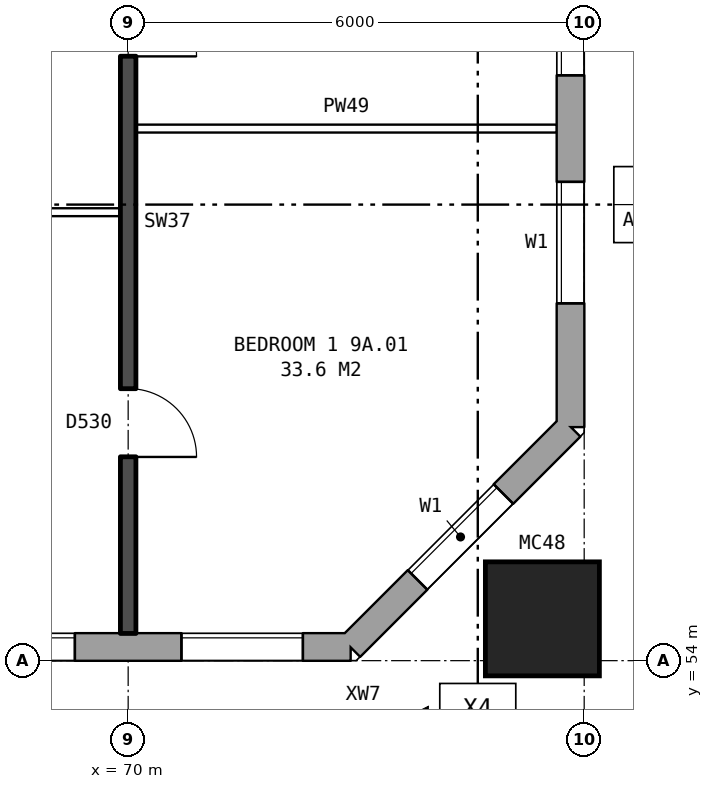
"""IFC4 building model, lengths in metres.
Left out: names, types, materials, properties, quantities, classifications, styles, units other than length and angle.
Written with IfcOpenShell. Run it as: python <this file> out.ifc"""

import sys

from ifc_helpers import new_model, si_unit, direction, frame, frame_2d, origin, origin_2d, place, context, subcontext, project, spatial, rectangle, hollow_rectangle, extrude, element, fill, save


model = new_model("IFC4")
c1 = context("Model", 3, precision=1e-05, world=origin(), true_north=direction((0.0, 1.0)))
c2 = subcontext(c1, "Body", "Model", "MODEL_VIEW")
j1 = project(units=[si_unit("LENGTHUNIT", "METRE"), si_unit("PLANEANGLEUNIT", "RADIAN")], contexts=[c1])
p1 = place(None, origin())
s1 = spatial("IfcSite", under=j1, at=p1, CompositionType="ELEMENT")
p2 = place(p1, origin())
s2 = spatial("IfcBuilding", under=s1, at=p2, CompositionType="ELEMENT")
p3 = place(p2, frame((0.0, 0.0, 35.0)))
s3 = spatial("IfcBuildingStorey", under=s2, at=p3, CompositionType="ELEMENT", Elevation=35.0)
p4 = place(p3, frame((75.45, 54.55, 0.0), z_axis=(0.0, 0.0, 1.0), x_axis=(1.0, 0.0, 0.0)))
e1 = element("IfcColumn", 1, at=p4, inside=s3, PredefinedType="COLUMN", context=c2, shape_type="SweptSolid", body=[
    extrude(hollow_rectangle(XDim=1.5, YDim=1.5, WallThickness=0.08, at=origin_2d()), origin(), (0.0, 0.0, 1.0), 3.1),
])
p5 = place(p3, frame((22.825, 54.18, 0.0), z_axis=(0.0, 0.0, 1.0), x_axis=(1.0, 0.0, 0.0)))
e2 = element("IfcWall", 2, at=p5, inside=s3, PredefinedType="STANDARD", context=c2, shape_type="SweptSolid", body=[
    extrude(rectangle(XDim=50.101, YDim=0.36, at=frame_2d((25.05, 0.0))), origin(), (0.0, 0.0, 1.0), 2.85),
])
p6 = place(p5, frame((2.875, 0.0, 0.8)))
e3 = element("IfcOpeningElement", 3, at=p6, cuts=e2, PredefinedType="OPENING", context=c2, shape_type="SweptSolid", body=[
    extrude(rectangle(XDim=1.6, YDim=1.8, at=frame_2d((0.8, 0.9))), frame((0.0, 0.19, 0.0), z_axis=(0.0, -1.0, 0.0), x_axis=(1.0, 0.0, 0.0)), (0.0, 0.0, 1.0), 0.38),
])
p7 = place(p5, frame((5.875, 0.0, 0.8)))
e4 = element("IfcOpeningElement", 4, at=p7, cuts=e2, PredefinedType="OPENING", context=c2, shape_type="SweptSolid", body=[
    extrude(rectangle(XDim=1.6, YDim=1.8, at=frame_2d((0.8, 0.9))), frame((0.0, 0.19, 0.0), z_axis=(0.0, -1.0, 0.0), x_axis=(1.0, 0.0, 0.0)), (0.0, 0.0, 1.0), 0.38),
])
p8 = place(p5, frame((8.875, 0.0, 0.8)))
e5 = element("IfcOpeningElement", 5, at=p8, cuts=e2, PredefinedType="OPENING", context=c2, shape_type="SweptSolid", body=[
    extrude(rectangle(XDim=1.6, YDim=1.8, at=frame_2d((0.8, 0.9))), frame((0.0, 0.19, 0.0), z_axis=(0.0, -1.0, 0.0), x_axis=(1.0, 0.0, 0.0)), (0.0, 0.0, 1.0), 0.38),
])
p9 = place(p5, frame((11.875, 0.0, 0.8)))
e6 = element("IfcOpeningElement", 6, at=p9, cuts=e2, PredefinedType="OPENING", context=c2, shape_type="SweptSolid", body=[
    extrude(rectangle(XDim=1.6, YDim=1.8, at=frame_2d((0.8, 0.9))), frame((0.0, 0.19, 0.0), z_axis=(0.0, -1.0, 0.0), x_axis=(1.0, 0.0, 0.0)), (0.0, 0.0, 1.0), 0.38),
])
p10 = place(p5, frame((14.875, 0.0, 0.8)))
e7 = element("IfcOpeningElement", 7, at=p10, cuts=e2, PredefinedType="OPENING", context=c2, shape_type="SweptSolid", body=[
    extrude(rectangle(XDim=1.6, YDim=1.8, at=frame_2d((0.8, 0.9))), frame((0.0, 0.19, 0.0), z_axis=(0.0, -1.0, 0.0), x_axis=(1.0, 0.0, 0.0)), (0.0, 0.0, 1.0), 0.38),
])
p11 = place(p5, frame((17.875, 0.0, 0.8)))
e8 = element("IfcOpeningElement", 8, at=p11, cuts=e2, PredefinedType="OPENING", context=c2, shape_type="SweptSolid", body=[
    extrude(rectangle(XDim=1.6, YDim=1.8, at=frame_2d((0.8, 0.9))), frame((0.0, 0.19, 0.0), z_axis=(0.0, -1.0, 0.0), x_axis=(1.0, 0.0, 0.0)), (0.0, 0.0, 1.0), 0.38),
])
p12 = place(p5, frame((19.775, 0.0, 0.8)))
e9 = element("IfcOpeningElement", 9, at=p12, cuts=e2, PredefinedType="OPENING", context=c2, shape_type="SweptSolid", body=[
    extrude(rectangle(XDim=1.6, YDim=1.8, at=frame_2d((0.8, 0.9))), frame((0.0, 0.19, 0.0), z_axis=(0.0, -1.0, 0.0), x_axis=(1.0, 0.0, 0.0)), (0.0, 0.0, 1.0), 0.38),
])
p13 = place(p5, frame((23.375, 0.0, 0.15)))
e10 = element("IfcOpeningElement", 10, at=p13, cuts=e2, PredefinedType="OPENING", context=c2, shape_type="SweptSolid", body=[
    extrude(rectangle(XDim=0.6, YDim=0.9, at=frame_2d((0.3, 0.45))), frame((0.0, 0.19, 0.0), z_axis=(0.0, -1.0, 0.0), x_axis=(1.0, 0.0, 0.0)), (0.0, 0.0, 1.0), 0.38),
])
p14 = place(p5, frame((27.275, 0.0, 1.7)))
e11 = element("IfcOpeningElement", 11, at=p14, cuts=e2, PredefinedType="OPENING", context=c2, shape_type="SweptSolid", body=[
    extrude(rectangle(XDim=0.6, YDim=0.9, at=frame_2d((0.3, 0.45))), frame((0.0, 0.19, 0.0), z_axis=(0.0, -1.0, 0.0), x_axis=(1.0, 0.0, 0.0)), (0.0, 0.0, 1.0), 0.38),
])
p15 = place(p5, frame((29.875, 0.0, 0.8)))
e12 = element("IfcOpeningElement", 12, at=p15, cuts=e2, PredefinedType="OPENING", context=c2, shape_type="SweptSolid", body=[
    extrude(rectangle(XDim=1.6, YDim=1.8, at=frame_2d((0.8, 0.9))), frame((0.0, 0.19, 0.0), z_axis=(0.0, -1.0, 0.0), x_axis=(1.0, 0.0, 0.0)), (0.0, 0.0, 1.0), 0.38),
])
p16 = place(p5, frame((32.875, 0.0, 0.8)))
e13 = element("IfcOpeningElement", 13, at=p16, cuts=e2, PredefinedType="OPENING", context=c2, shape_type="SweptSolid", body=[
    extrude(rectangle(XDim=1.6, YDim=1.8, at=frame_2d((0.8, 0.9))), frame((0.0, 0.19, 0.0), z_axis=(0.0, -1.0, 0.0), x_axis=(1.0, 0.0, 0.0)), (0.0, 0.0, 1.0), 0.38),
])
p17 = place(p5, frame((35.875, 0.0, 0.8)))
e14 = element("IfcOpeningElement", 14, at=p17, cuts=e2, PredefinedType="OPENING", context=c2, shape_type="SweptSolid", body=[
    extrude(rectangle(XDim=1.6, YDim=1.8, at=frame_2d((0.8, 0.9))), frame((0.0, 0.19, 0.0), z_axis=(0.0, -1.0, 0.0), x_axis=(1.0, 0.0, 0.0)), (0.0, 0.0, 1.0), 0.38),
])
p18 = place(p5, frame((38.875, 0.0, 0.8)))
e15 = element("IfcOpeningElement", 15, at=p18, cuts=e2, PredefinedType="OPENING", context=c2, shape_type="SweptSolid", body=[
    extrude(rectangle(XDim=1.6, YDim=1.8, at=frame_2d((0.8, 0.9))), frame((0.0, 0.19, 0.0), z_axis=(0.0, -1.0, 0.0), x_axis=(1.0, 0.0, 0.0)), (0.0, 0.0, 1.0), 0.38),
])
p19 = place(p5, frame((41.875, 0.0, 0.8)))
e16 = element("IfcOpeningElement", 16, at=p19, cuts=e2, PredefinedType="OPENING", context=c2, shape_type="SweptSolid", body=[
    extrude(rectangle(XDim=1.6, YDim=1.8, at=frame_2d((0.8, 0.9))), frame((0.0, 0.19, 0.0), z_axis=(0.0, -1.0, 0.0), x_axis=(1.0, 0.0, 0.0)), (0.0, 0.0, 1.0), 0.38),
])
p20 = place(p5, frame((44.875, 0.0, 0.8)))
e17 = element("IfcOpeningElement", 17, at=p20, cuts=e2, PredefinedType="OPENING", context=c2, shape_type="SweptSolid", body=[
    extrude(rectangle(XDim=1.6, YDim=1.8, at=frame_2d((0.8, 0.9))), frame((0.0, 0.19, 0.0), z_axis=(0.0, -1.0, 0.0), x_axis=(1.0, 0.0, 0.0)), (0.0, 0.0, 1.0), 0.38),
])
p21 = place(p5, frame((47.875, 0.0, 0.8)))
e18 = element("IfcOpeningElement", 18, at=p21, cuts=e2, PredefinedType="OPENING", context=c2, shape_type="SweptSolid", body=[
    extrude(rectangle(XDim=1.6, YDim=1.8, at=frame_2d((0.8, 0.9))), frame((0.0, 0.19, 0.0), z_axis=(0.0, -1.0, 0.0), x_axis=(1.0, 0.0, 0.0)), (0.0, 0.0, 1.0), 0.38),
])
p22 = place(p5, frame((21.675, 0.0, 1.4)))
e19 = element("IfcOpeningElement", 19, at=p22, cuts=e2, PredefinedType="OPENING", context=c2, shape_type="SweptSolid", body=[
    extrude(rectangle(XDim=0.6, YDim=1.2, at=frame_2d((0.3, 0.6))), frame((0.0, 0.19, 0.0), z_axis=(0.0, -1.0, 0.0), x_axis=(1.0, 0.0, 0.0)), (0.0, 0.0, 1.0), 0.38),
])
p23 = place(p5, frame((24.275, 0.0, 0.15)))
e20 = element("IfcOpeningElement", 20, at=p23, cuts=e2, PredefinedType="OPENING", context=c2, shape_type="SweptSolid", body=[
    extrude(rectangle(XDim=1.6, YDim=1.5, at=frame_2d((0.8, 0.75))), frame((0.0, 0.19, 0.0), z_axis=(0.0, -1.0, 0.0), x_axis=(1.0, 0.0, 0.0)), (0.0, 0.0, 1.0), 0.38),
])
p24 = place(p5, frame((28.175, 0.0, 1.1)))
e21 = element("IfcOpeningElement", 21, at=p24, cuts=e2, PredefinedType="OPENING", context=c2, shape_type="SweptSolid", body=[
    extrude(rectangle(XDim=0.8, YDim=1.5, at=frame_2d((0.4, 0.75))), frame((0.0, 0.19, 0.0), z_axis=(0.0, -1.0, 0.0), x_axis=(1.0, 0.0, 0.0)), (0.0, 0.0, 1.0), 0.38),
])
p25 = place(p3, frame((72.925, 54.18, 0.0), z_axis=(0.0, 0.0, 1.0), x_axis=(0.707106781187, 0.707106781187, 0.0)))
e22 = element("IfcWall", 22, at=p25, inside=s3, PredefinedType="STANDARD", context=c2, shape_type="SweptSolid", body=[
    extrude(rectangle(XDim=4.094, YDim=0.36, at=frame_2d((2.047, 0.0))), origin(), (0.0, 0.0, 1.0), 2.85),
])
p26 = place(p25, frame((1.247, 0.0, 0.8)))
e23 = element("IfcOpeningElement", 23, at=p26, cuts=e22, PredefinedType="OPENING", context=c2, shape_type="SweptSolid", body=[
    extrude(rectangle(XDim=1.6, YDim=1.8, at=frame_2d((0.8, 0.9))), frame((0.0, 0.19, 0.0), z_axis=(0.0, -1.0, 0.0), x_axis=(1.0, 0.0, 0.0)), (0.0, 0.0, 1.0), 0.38),
])
p27 = place(p3, frame((75.82, 57.075, 0.0), z_axis=(0.0, 0.0, 1.0), x_axis=(0.0, 1.0, 0.0)))
e24 = element("IfcWall", 24, at=p27, inside=s3, PredefinedType="STANDARD", context=c2, shape_type="SweptSolid", body=[
    extrude(rectangle(XDim=25.851, YDim=0.36, at=frame_2d((12.925, 0.0))), origin(), (0.0, 0.0, 1.0), 2.85),
])
p28 = place(p27, frame((1.625, 0.0, 0.8)))
e25 = element("IfcOpeningElement", 25, at=p28, cuts=e24, PredefinedType="OPENING", context=c2, shape_type="SweptSolid", body=[
    extrude(rectangle(XDim=1.6, YDim=1.8, at=frame_2d((0.8, 0.9))), frame((0.0, 0.19, 0.0), z_axis=(0.0, -1.0, 0.0), x_axis=(1.0, 0.0, 0.0)), (0.0, 0.0, 1.0), 0.38),
])
p29 = place(p27, frame((4.625, 0.0, 0.8)))
e26 = element("IfcOpeningElement", 26, at=p29, cuts=e24, PredefinedType="OPENING", context=c2, shape_type="SweptSolid", body=[
    extrude(rectangle(XDim=1.6, YDim=1.8, at=frame_2d((0.8, 0.9))), frame((0.0, 0.19, 0.0), z_axis=(0.0, -1.0, 0.0), x_axis=(1.0, 0.0, 0.0)), (0.0, 0.0, 1.0), 0.38),
])
p30 = place(p27, frame((19.625, 0.0, 0.8)))
e27 = element("IfcOpeningElement", 27, at=p30, cuts=e24, PredefinedType="OPENING", context=c2, shape_type="SweptSolid", body=[
    extrude(rectangle(XDim=1.6, YDim=1.8, at=frame_2d((0.8, 0.9))), frame((0.0, 0.19, 0.0), z_axis=(0.0, -1.0, 0.0), x_axis=(1.0, 0.0, 0.0)), (0.0, 0.0, 1.0), 0.38),
])
p31 = place(p27, frame((22.625, 0.0, 0.8)))
e28 = element("IfcOpeningElement", 28, at=p31, cuts=e24, PredefinedType="OPENING", context=c2, shape_type="SweptSolid", body=[
    extrude(rectangle(XDim=1.6, YDim=1.8, at=frame_2d((0.8, 0.9))), frame((0.0, 0.19, 0.0), z_axis=(0.0, -1.0, 0.0), x_axis=(1.0, 0.0, 0.0)), (0.0, 0.0, 1.0), 0.38),
])
p32 = place(p3, frame((64.1, 59.9, 0.0), z_axis=(0.0, 0.0, 1.0), x_axis=(1.0, 0.0, 0.0)))
e29 = element("IfcWall", 29, at=p32, inside=s3, PredefinedType="PARTITIONING", context=c2, shape_type="SweptSolid", body=[
    extrude(rectangle(XDim=5.8, YDim=0.1, at=frame_2d((2.9, 0.0))), origin(), (0.0, 0.0, 1.0), 2.85),
])
p33 = place(p32, frame((3.6, 0.0, 0.0)))
e30 = element("IfcOpeningElement", 30, at=p33, cuts=e29, PredefinedType="OPENING", context=c2, shape_type="SweptSolid", body=[
    extrude(rectangle(XDim=0.9, YDim=2.1, at=frame_2d((0.45, 1.05))), frame((0.0, 0.06, 0.0), z_axis=(0.0, -1.0, 0.0), x_axis=(1.0, 0.0, 0.0)), (0.0, 0.0, 1.0), 0.12),
])
p34 = place(p32, frame((0.7, 0.0, 0.0)))
e31 = element("IfcOpeningElement", 31, at=p34, cuts=e29, PredefinedType="OPENING", context=c2, shape_type="SweptSolid", body=[
    extrude(rectangle(XDim=0.9, YDim=2.1, at=frame_2d((0.45, 1.05))), frame((0.0, 0.06, 0.0), z_axis=(0.0, -1.0, 0.0), x_axis=(1.0, 0.0, 0.0)), (0.0, 0.0, 1.0), 0.12),
])
p35 = place(p3, frame((70.1, 61.0, 0.0), z_axis=(0.0, 0.0, 1.0), x_axis=(1.0, 0.0, 0.0)))
e32 = element("IfcWall", 32, at=p35, inside=s3, PredefinedType="PARTITIONING", context=c2, shape_type="SweptSolid", body=[
    extrude(rectangle(XDim=5.54, YDim=0.1, at=frame_2d((2.77, 0.0))), origin(), (0.0, 0.0, 1.0), 2.85),
])
p36 = place(p3, frame((70.0, 54.36, 0.0), z_axis=(0.0, 0.0, 1.0), x_axis=(0.0, 1.0, 0.0)))
e33 = element("IfcWall", 33, at=p36, inside=s3, PredefinedType="SOLIDWALL", context=c2, shape_type="SweptSolid", body=[
    extrude(rectangle(XDim=9.44, YDim=0.2, at=frame_2d((4.72, 0.0))), origin(), (0.0, 0.0, 1.0), 2.85),
])
p37 = place(p36, frame((2.32, 0.0, 0.0)))
e34 = element("IfcOpeningElement", 34, at=p37, cuts=e33, PredefinedType="OPENING", context=c2, shape_type="SweptSolid", body=[
    extrude(rectangle(XDim=0.9, YDim=2.1, at=frame_2d((0.45, 1.05))), frame((0.0, 0.11, 0.0), z_axis=(0.0, -1.0, 0.0), x_axis=(1.0, 0.0, 0.0)), (0.0, 0.0, 1.0), 0.22),
])
p38 = place(p36, frame((7.59, 0.0, 0.0)))
e35 = element("IfcOpeningElement", 35, at=p38, cuts=e33, PredefinedType="OPENING", context=c2, shape_type="SweptSolid", body=[
    extrude(rectangle(XDim=0.9, YDim=2.1, at=frame_2d((0.45, 1.05))), frame((0.0, 0.11, 0.0), z_axis=(0.0, -1.0, 0.0), x_axis=(1.0, 0.0, 0.0)), (0.0, 0.0, 1.0), 0.22),
])
p39 = place(p20, origin())
e36 = element("IfcWindow", 36, at=p39, inside=s3, PartitioningType="SINGLE_PANEL", PredefinedType="WINDOW", context=c2, shape_type="SweptSolid", body=[
    extrude(rectangle(XDim=1.6, YDim=1.8, at=frame_2d((0.8, 0.9))), frame((0.0, 0.15, 0.0), z_axis=(0.0, -1.0, 0.0), x_axis=(1.0, 0.0, 0.0)), (0.0, 0.0, 1.0), 0.06),
])
fill(e17, e36)
p40 = place(p21, origin())
e37 = element("IfcWindow", 37, at=p40, inside=s3, PartitioningType="SINGLE_PANEL", PredefinedType="WINDOW", context=c2, shape_type="SweptSolid", body=[
    extrude(rectangle(XDim=1.6, YDim=1.8, at=frame_2d((0.8, 0.9))), frame((0.0, 0.15, 0.0), z_axis=(0.0, -1.0, 0.0), x_axis=(1.0, 0.0, 0.0)), (0.0, 0.0, 1.0), 0.06),
])
fill(e18, e37)
p41 = place(p26, origin())
e38 = element("IfcWindow", 38, at=p41, inside=s3, PartitioningType="SINGLE_PANEL", PredefinedType="WINDOW", context=c2, shape_type="SweptSolid", body=[
    extrude(rectangle(XDim=1.6, YDim=1.8, at=frame_2d((0.8, 0.9))), frame((0.0, 0.15, 0.0), z_axis=(0.0, -1.0, 0.0), x_axis=(1.0, 0.0, 0.0)), (0.0, 0.0, 1.0), 0.06),
])
fill(e23, e38)
p42 = place(p28, origin())
e39 = element("IfcWindow", 39, at=p42, inside=s3, PartitioningType="SINGLE_PANEL", PredefinedType="WINDOW", context=c2, shape_type="SweptSolid", body=[
    extrude(rectangle(XDim=1.6, YDim=1.8, at=frame_2d((0.8, 0.9))), frame((0.0, 0.15, 0.0), z_axis=(0.0, -1.0, 0.0), x_axis=(1.0, 0.0, 0.0)), (0.0, 0.0, 1.0), 0.06),
])
fill(e25, e39)
p43 = place(p29, origin())
e40 = element("IfcWindow", 40, at=p43, inside=s3, PartitioningType="SINGLE_PANEL", PredefinedType="WINDOW", context=c2, shape_type="SweptSolid", body=[
    extrude(rectangle(XDim=1.6, YDim=1.8, at=frame_2d((0.8, 0.9))), frame((0.0, 0.15, 0.0), z_axis=(0.0, -1.0, 0.0), x_axis=(1.0, 0.0, 0.0)), (0.0, 0.0, 1.0), 0.06),
])
fill(e26, e40)
p44 = place(p37, frame((0.9, 0.0, 0.0), z_axis=(0.0, 0.0, 1.0), x_axis=(-1.0, 0.0, 0.0)))
e41 = element("IfcDoor", 41, at=p44, inside=s3, OperationType="SINGLE_SWING_RIGHT", PredefinedType="DOOR", context=c2, shape_type="SweptSolid", body=[
    extrude(rectangle(XDim=0.9, YDim=2.1, at=frame_2d((0.45, 1.05))), frame((0.0, 0.025, 0.0), z_axis=(0.0, -1.0, 0.0), x_axis=(1.0, 0.0, 0.0)), (0.0, 0.0, 1.0), 0.05),
])
fill(e34, e41)
p45 = place(p38, frame((0.9, 0.0, 0.0), z_axis=(0.0, 0.0, 1.0), x_axis=(-1.0, 0.0, 0.0)))
e42 = element("IfcDoor", 42, at=p45, inside=s3, OperationType="SINGLE_SWING_RIGHT", PredefinedType="DOOR", context=c2, shape_type="SweptSolid", body=[
    extrude(rectangle(XDim=0.9, YDim=2.1, at=frame_2d((0.45, 1.05))), frame((0.0, 0.025, 0.0), z_axis=(0.0, -1.0, 0.0), x_axis=(1.0, 0.0, 0.0)), (0.0, 0.0, 1.0), 0.05),
])
fill(e35, e42)
save(model, sys.argv[1])
